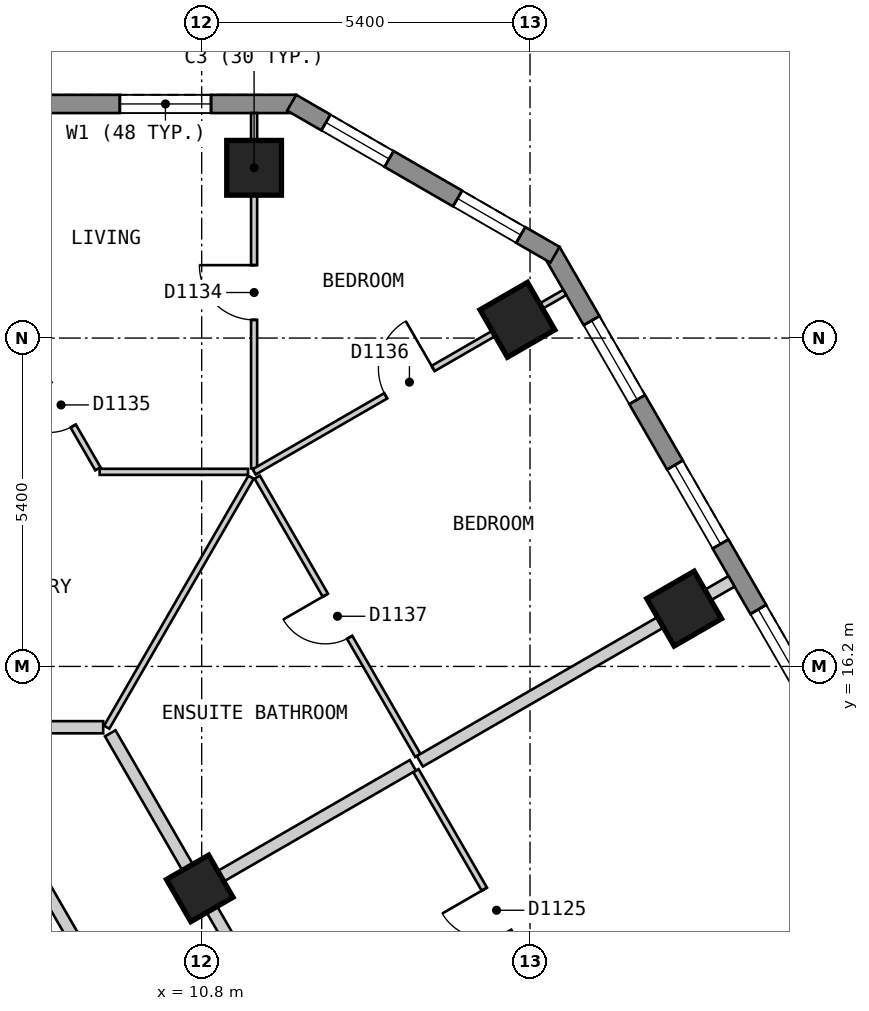
"""IFC4 building model, lengths in metres.
Left out: names, types, materials, properties, quantities, classifications, styles, units other than length and angle.
Written with IfcOpenShell. Run it as: python <this file> out.ifc"""

import sys

from ifc_helpers import new_model, si_unit, direction, frame, frame_2d, origin, origin_2d, place, context, subcontext, project, spatial, polyline, rectangle, outline, extrude, element, fill, save


model = new_model("IFC4")
c1 = context("Model", 3, precision=1e-05, world=origin(), true_north=direction((0.0, 1.0)))
c2 = subcontext(c1, "Body", "Model", "MODEL_VIEW")
j1 = project(units=[si_unit("LENGTHUNIT", "METRE"), si_unit("PLANEANGLEUNIT", "RADIAN")], contexts=[c1])
p1 = place(None, origin())
s1 = spatial("IfcSite", under=j1, at=p1, CompositionType="ELEMENT")
p2 = place(p1, origin())
s2 = spatial("IfcBuilding", under=s1, at=p2, CompositionType="ELEMENT")
p3 = place(p2, frame((0.0, 0.0, 150.6)))
s3 = spatial("IfcBuildingStorey", under=s2, at=p3, CompositionType="ELEMENT", Elevation=150.6)
for number, where, z_axis, x_axis in (
    (1, (11.662, 24.4, 0.0), (0.0, 0.0, 1.0), (-1.0, 0.0, 0.0)),
    (2, (18.735, 17.15, 0.0), (0.0, 0.0, 1.0), (-0.5, 0.866, 0.0)),
    (3, (15.993, 21.9, 0.0), (0.0, 0.0, 1.0), (-0.5, 0.866, 0.0)),
):
    element("IfcColumn", number, at=place(p3, frame(where, z_axis=z_axis, x_axis=x_axis)), inside=s3, PredefinedType="COLUMN", context=c2, shape_type="SweptSolid", body=[
        extrude(rectangle(XDim=0.9, YDim=0.9, at=origin_2d()), origin(), (0.0, 0.0, 1.0), 3.0),
    ])
p4 = place(p3, frame((10.768, 12.55, 0.0), z_axis=(0.0, 0.0, 1.0), x_axis=(-0.5, 0.866025403784, 0.0)))
e4 = element("IfcColumn", 4, at=p4, inside=s3, PredefinedType="COLUMN", context=c2, shape_type="SweptSolid", body=[
    extrude(rectangle(XDim=0.8, YDim=0.8, at=origin_2d()), origin(), (0.0, 0.0, 1.0), 3.0),
])
p5 = place(p3, frame((12.355, 25.45, 0.0), z_axis=(0.0, 0.0, 1.0), x_axis=(-1.0, 0.0, 0.0)))
e5 = element("IfcWall", 5, at=p5, inside=s3, PredefinedType="SOLIDWALL", context=c2, shape_type="SweptSolid", body=[
    extrude(outline(polyline([(0.0, -0.15), (24.71, -0.15), (24.63, 0.15), (0.08, 0.15), (0.0, -0.15)])), origin(), (0.0, 0.0, 1.0), 2.6),
])
p6 = place(p5, frame((1.401, 0.0, 0.15)))
e6 = element("IfcOpeningElement", 6, at=p6, cuts=e5, PredefinedType="OPENING", context=c2, shape_type="SweptSolid", body=[
    extrude(rectangle(XDim=1.5, YDim=2.1, at=frame_2d((0.75, 1.05))), frame((0.0, 0.16, 0.0), z_axis=(0.0, -1.0, 0.0), x_axis=(1.0, 0.0, 0.0)), (0.0, 0.0, 1.0), 0.32),
])
p7 = place(p5, frame((4.316, 0.0, 0.15)))
e7 = element("IfcOpeningElement", 7, at=p7, cuts=e5, PredefinedType="OPENING", context=c2, shape_type="SweptSolid", body=[
    extrude(rectangle(XDim=1.5, YDim=2.1, at=frame_2d((0.75, 1.05))), frame((0.0, 0.16, 0.0), z_axis=(0.0, -1.0, 0.0), x_axis=(1.0, 0.0, 0.0)), (0.0, 0.0, 1.0), 0.32),
])
p8 = place(p5, frame((7.232, 0.0, 0.15)))
e8 = element("IfcOpeningElement", 8, at=p8, cuts=e5, PredefinedType="OPENING", context=c2, shape_type="SweptSolid", body=[
    extrude(rectangle(XDim=1.5, YDim=2.1, at=frame_2d((0.75, 1.05))), frame((0.0, 0.16, 0.0), z_axis=(0.0, -1.0, 0.0), x_axis=(1.0, 0.0, 0.0)), (0.0, 0.0, 1.0), 0.32),
])
p9 = place(p5, frame((10.147, 0.0, 0.15)))
e9 = element("IfcOpeningElement", 9, at=p9, cuts=e5, PredefinedType="OPENING", context=c2, shape_type="SweptSolid", body=[
    extrude(rectangle(XDim=1.5, YDim=2.1, at=frame_2d((0.75, 1.05))), frame((0.0, 0.16, 0.0), z_axis=(0.0, -1.0, 0.0), x_axis=(1.0, 0.0, 0.0)), (0.0, 0.0, 1.0), 0.32),
])
p10 = place(p5, frame((13.063, 0.0, 0.15)))
e10 = element("IfcOpeningElement", 10, at=p10, cuts=e5, PredefinedType="OPENING", context=c2, shape_type="SweptSolid", body=[
    extrude(rectangle(XDim=1.5, YDim=2.1, at=frame_2d((0.75, 1.05))), frame((0.0, 0.16, 0.0), z_axis=(0.0, -1.0, 0.0), x_axis=(1.0, 0.0, 0.0)), (0.0, 0.0, 1.0), 0.32),
])
p11 = place(p5, frame((15.978, 0.0, 0.15)))
e11 = element("IfcOpeningElement", 11, at=p11, cuts=e5, PredefinedType="OPENING", context=c2, shape_type="SweptSolid", body=[
    extrude(rectangle(XDim=1.5, YDim=2.1, at=frame_2d((0.75, 1.05))), frame((0.0, 0.16, 0.0), z_axis=(0.0, -1.0, 0.0), x_axis=(1.0, 0.0, 0.0)), (0.0, 0.0, 1.0), 0.32),
])
p12 = place(p5, frame((18.894, 0.0, 0.15)))
e12 = element("IfcOpeningElement", 12, at=p12, cuts=e5, PredefinedType="OPENING", context=c2, shape_type="SweptSolid", body=[
    extrude(rectangle(XDim=1.5, YDim=2.1, at=frame_2d((0.75, 1.05))), frame((0.0, 0.16, 0.0), z_axis=(0.0, -1.0, 0.0), x_axis=(1.0, 0.0, 0.0)), (0.0, 0.0, 1.0), 0.32),
])
p13 = place(p5, frame((21.809, 0.0, 0.15)))
e13 = element("IfcOpeningElement", 13, at=p13, cuts=e5, PredefinedType="OPENING", context=c2, shape_type="SweptSolid", body=[
    extrude(rectangle(XDim=1.5, YDim=2.1, at=frame_2d((0.75, 1.05))), frame((0.0, 0.16, 0.0), z_axis=(0.0, -1.0, 0.0), x_axis=(1.0, 0.0, 0.0)), (0.0, 0.0, 1.0), 0.32),
])
p14 = place(p3, frame((28.218, 2.825, 0.0), z_axis=(0.0, 0.0, 1.0), x_axis=(-0.500020536353, 0.866013546791, 0.0)))
e14 = element("IfcWall", 14, at=p14, inside=s3, PredefinedType="SOLIDWALL", context=c2, shape_type="SweptSolid", body=[
    extrude(outline(polyline([(0.0, -0.15), (23.325, -0.15), (23.245, 0.15), (0.08, 0.15), (0.0, -0.15)])), origin(), (0.0, 0.0, 1.0), 2.6),
])
p15 = place(p14, frame((1.314, 0.0, 0.15)))
e15 = element("IfcOpeningElement", 15, at=p15, cuts=e14, PredefinedType="OPENING", context=c2, shape_type="SweptSolid", body=[
    extrude(rectangle(XDim=1.5, YDim=2.1, at=frame_2d((0.75, 1.05))), frame((0.0, 0.16, 0.0), z_axis=(0.0, -1.0, 0.0), x_axis=(1.0, 0.0, 0.0)), (0.0, 0.0, 1.0), 0.32),
])
p16 = place(p14, frame((4.056, 0.0, 0.15)))
e16 = element("IfcOpeningElement", 16, at=p16, cuts=e14, PredefinedType="OPENING", context=c2, shape_type="SweptSolid", body=[
    extrude(rectangle(XDim=1.5, YDim=2.1, at=frame_2d((0.75, 1.05))), frame((0.0, 0.16, 0.0), z_axis=(0.0, -1.0, 0.0), x_axis=(1.0, 0.0, 0.0)), (0.0, 0.0, 1.0), 0.32),
])
p17 = place(p14, frame((6.798, 0.0, 0.15)))
e17 = element("IfcOpeningElement", 17, at=p17, cuts=e14, PredefinedType="OPENING", context=c2, shape_type="SweptSolid", body=[
    extrude(rectangle(XDim=1.5, YDim=2.1, at=frame_2d((0.75, 1.05))), frame((0.0, 0.16, 0.0), z_axis=(0.0, -1.0, 0.0), x_axis=(1.0, 0.0, 0.0)), (0.0, 0.0, 1.0), 0.32),
])
p18 = place(p14, frame((9.541, 0.0, 0.15)))
e18 = element("IfcOpeningElement", 18, at=p18, cuts=e14, PredefinedType="OPENING", context=c2, shape_type="SweptSolid", body=[
    extrude(rectangle(XDim=1.5, YDim=2.1, at=frame_2d((0.75, 1.05))), frame((0.0, 0.16, 0.0), z_axis=(0.0, -1.0, 0.0), x_axis=(1.0, 0.0, 0.0)), (0.0, 0.0, 1.0), 0.32),
])
p19 = place(p14, frame((12.284, 0.0, 0.15)))
e19 = element("IfcOpeningElement", 19, at=p19, cuts=e14, PredefinedType="OPENING", context=c2, shape_type="SweptSolid", body=[
    extrude(rectangle(XDim=1.5, YDim=2.1, at=frame_2d((0.75, 1.05))), frame((0.0, 0.16, 0.0), z_axis=(0.0, -1.0, 0.0), x_axis=(1.0, 0.0, 0.0)), (0.0, 0.0, 1.0), 0.32),
])
p20 = place(p14, frame((15.027, 0.0, 0.15)))
e20 = element("IfcOpeningElement", 20, at=p20, cuts=e14, PredefinedType="OPENING", context=c2, shape_type="SweptSolid", body=[
    extrude(rectangle(XDim=1.5, YDim=2.1, at=frame_2d((0.75, 1.05))), frame((0.0, 0.16, 0.0), z_axis=(0.0, -1.0, 0.0), x_axis=(1.0, 0.0, 0.0)), (0.0, 0.0, 1.0), 0.32),
])
p21 = place(p14, frame((17.769, 0.0, 0.15)))
e21 = element("IfcOpeningElement", 21, at=p21, cuts=e14, PredefinedType="OPENING", context=c2, shape_type="SweptSolid", body=[
    extrude(rectangle(XDim=1.5, YDim=2.1, at=frame_2d((0.75, 1.05))), frame((0.0, 0.16, 0.0), z_axis=(0.0, -1.0, 0.0), x_axis=(1.0, 0.0, 0.0)), (0.0, 0.0, 1.0), 0.32),
])
p22 = place(p14, frame((20.511, 0.0, 0.15)))
e22 = element("IfcOpeningElement", 22, at=p22, cuts=e14, PredefinedType="OPENING", context=c2, shape_type="SweptSolid", body=[
    extrude(rectangle(XDim=1.5, YDim=2.1, at=frame_2d((0.75, 1.05))), frame((0.0, 0.16, 0.0), z_axis=(0.0, -1.0, 0.0), x_axis=(1.0, 0.0, 0.0)), (0.0, 0.0, 1.0), 0.32),
])
p23 = place(p3, frame((16.61, 22.97, 0.0), z_axis=(0.0, 0.0, 1.0), x_axis=(-0.866022959057, 0.500004234368, 0.0)))
e23 = element("IfcWall", 23, at=p23, inside=s3, PredefinedType="SOLIDWALL", context=c2, shape_type="SweptSolid", body=[
    extrude(outline(polyline([(0.0, -0.15), (5.0, -0.15), (4.92, 0.15), (0.08, 0.15), (0.0, -0.15)])), origin(), (0.0, 0.0, 1.0), 2.6),
])
p24 = place(p23, frame((0.65, 0.0, 0.15)))
e24 = element("IfcOpeningElement", 24, at=p24, cuts=e23, PredefinedType="OPENING", context=c2, shape_type="SweptSolid", body=[
    extrude(rectangle(XDim=1.2, YDim=2.1, at=frame_2d((0.6, 1.05))), frame((0.0, 0.16, 0.0), z_axis=(0.0, -1.0, 0.0), x_axis=(1.0, 0.0, 0.0)), (0.0, 0.0, 1.0), 0.32),
])
p25 = place(p23, frame((3.15, 0.0, 0.15)))
e25 = element("IfcOpeningElement", 25, at=p25, cuts=e23, PredefinedType="OPENING", context=c2, shape_type="SweptSolid", body=[
    extrude(rectangle(XDim=1.2, YDim=2.1, at=frame_2d((0.6, 1.05))), frame((0.0, 0.16, 0.0), z_axis=(0.0, -1.0, 0.0), x_axis=(1.0, 0.0, 0.0)), (0.0, 0.0, 1.0), 0.32),
])
p26 = place(p3, frame((7.967, 13.0, 0.0), z_axis=(0.0, 0.0, 1.0), x_axis=(0.50003774998, -0.866003607726, 0.0)))
e26 = element("IfcWall", 26, at=p26, inside=s3, PredefinedType="PARTITIONING", context=c2, shape_type="SweptSolid", body=[
    extrude(rectangle(XDim=14.433, YDim=0.2, at=frame_2d((7.217, 0.0))), origin(), (0.0, 0.0, 1.0), 2.6),
])
p27 = place(p26, frame((6.824, 0.0, 0.0)))
e27 = element("IfcOpeningElement", 27, at=p27, cuts=e26, PredefinedType="OPENING", context=c2, shape_type="SweptSolid", body=[
    extrude(rectangle(XDim=0.9, YDim=2.1, at=frame_2d((0.45, 1.05))), frame((0.0, 0.11, 0.0), z_axis=(0.0, -1.0, 0.0), x_axis=(1.0, 0.0, 0.0)), (0.0, 0.0, 1.0), 0.22),
])
p28 = place(p3, frame((9.296, 15.1, 0.0), z_axis=(0.0, 0.0, 1.0), x_axis=(0.499974024244, -0.866040400375, 0.0)))
e28 = element("IfcWall", 28, at=p28, inside=s3, PredefinedType="PARTITIONING", context=c2, shape_type="SweptSolid", body=[
    extrude(rectangle(XDim=16.857, YDim=0.2, at=frame_2d((8.429, 0.0))), origin(), (0.0, 0.0, 1.0), 2.6),
])
p29 = place(p28, frame((11.522, 0.0, 0.0)))
e29 = element("IfcOpeningElement", 29, at=p29, cuts=e28, PredefinedType="OPENING", context=c2, shape_type="SweptSolid", body=[
    extrude(rectangle(XDim=1.0, YDim=2.1, at=frame_2d((0.5, 1.05))), frame((0.0, 0.11, 0.0), z_axis=(0.0, -1.0, 0.0), x_axis=(1.0, 0.0, 0.0)), (0.0, 0.0, 1.0), 0.22),
])
p30 = place(p3, frame((6.697, 15.2, 0.0), z_axis=(0.0, 0.0, 1.0), x_axis=(1.0, 0.0, 0.0)))
e30 = element("IfcWall", 30, at=p30, inside=s3, PredefinedType="PARTITIONING", context=c2, shape_type="SweptSolid", body=[
    extrude(rectangle(XDim=2.483, YDim=0.2, at=frame_2d((1.241, 0.0))), origin(), (0.0, 0.0, 1.0), 2.6),
])
p31 = place(p3, frame((7.881, 21.55, 0.0), z_axis=(0.0, 0.0, 1.0), x_axis=(0.499821239653, -0.866128586522, 0.0)))
e31 = element("IfcWall", 31, at=p31, inside=s3, PredefinedType="PARTITIONING", context=c2, shape_type="SweptSolid", body=[
    extrude(rectangle(XDim=2.425, YDim=0.1, at=frame_2d((1.212, 0.0))), origin(), (0.0, 0.0, 1.0), 2.6),
])
p32 = place(p31, frame((0.812, 0.0, 0.0)))
e32 = element("IfcOpeningElement", 32, at=p32, cuts=e31, PredefinedType="OPENING", context=c2, shape_type="SweptSolid", body=[
    extrude(rectangle(XDim=0.8, YDim=2.1, at=frame_2d((0.4, 1.05))), frame((0.0, 0.06, 0.0), z_axis=(0.0, -1.0, 0.0), x_axis=(1.0, 0.0, 0.0)), (0.0, 0.0, 1.0), 0.12),
])
p33 = place(p3, frame((14.323, 14.487, 0.0), z_axis=(0.0, 0.0, 1.0), x_axis=(0.500011052545, -0.866019022501, 0.0)))
e33 = element("IfcWall", 33, at=p33, inside=s3, PredefinedType="PARTITIONING", context=c2, shape_type="SweptSolid", body=[
    extrude(rectangle(XDim=16.208, YDim=0.1, at=frame_2d((8.104, 0.0))), origin(), (0.0, 0.0, 1.0), 2.6),
])
p34 = place(p33, frame((8.484, 0.0, 0.0)))
e34 = element("IfcOpeningElement", 34, at=p34, cuts=e33, PredefinedType="OPENING", context=c2, shape_type="SweptSolid", body=[
    extrude(rectangle(XDim=0.9, YDim=2.1, at=frame_2d((0.45, 1.05))), frame((0.0, 0.06, 0.0), z_axis=(0.0, -1.0, 0.0), x_axis=(1.0, 0.0, 0.0)), (0.0, 0.0, 1.0), 0.12),
])
p35 = place(p33, frame((2.252, 0.0, 0.0)))
e35 = element("IfcOpeningElement", 35, at=p35, cuts=e33, PredefinedType="OPENING", context=c2, shape_type="SweptSolid", body=[
    extrude(rectangle(XDim=0.8, YDim=2.1, at=frame_2d((0.4, 1.05))), frame((0.0, 0.06, 0.0), z_axis=(0.0, -1.0, 0.0), x_axis=(1.0, 0.0, 0.0)), (0.0, 0.0, 1.0), 0.12),
])
p36 = place(p33, frame((13.167, 0.0, 0.0)))
e36 = element("IfcOpeningElement", 36, at=p36, cuts=e33, PredefinedType="OPENING", context=c2, shape_type="SweptSolid", body=[
    extrude(rectangle(XDim=0.8, YDim=2.1, at=frame_2d((0.4, 1.05))), frame((0.0, 0.06, 0.0), z_axis=(0.0, -1.0, 0.0), x_axis=(1.0, 0.0, 0.0)), (0.0, 0.0, 1.0), 0.12),
])
p37 = place(p3, frame((11.713, 19.313, 0.0), z_axis=(0.0, 0.0, 1.0), x_axis=(0.499945064984, -0.866057118208, 0.0)))
e37 = element("IfcWall", 37, at=p37, inside=s3, PredefinedType="PARTITIONING", context=c2, shape_type="SweptSolid", body=[
    extrude(rectangle(XDim=5.285, YDim=0.1, at=frame_2d((2.642, 0.0))), origin(), (0.0, 0.0, 1.0), 2.6),
])
p38 = place(p37, frame((2.242, 0.0, 0.0)))
e38 = element("IfcOpeningElement", 38, at=p38, cuts=e37, PredefinedType="OPENING", context=c2, shape_type="SweptSolid", body=[
    extrude(rectangle(XDim=0.8, YDim=2.1, at=frame_2d((0.4, 1.05))), frame((0.0, 0.06, 0.0), z_axis=(0.0, -1.0, 0.0), x_axis=(1.0, 0.0, 0.0)), (0.0, 0.0, 1.0), 0.12),
])
p39 = place(p3, frame((9.122, 19.4, 0.0), z_axis=(0.0, 0.0, 1.0), x_axis=(1.0, 0.0, 0.0)))
e39 = element("IfcWall", 39, at=p39, inside=s3, PredefinedType="PARTITIONING", context=c2, shape_type="SweptSolid", body=[
    extrude(rectangle(XDim=2.44, YDim=0.1, at=frame_2d((1.22, 0.0))), origin(), (0.0, 0.0, 1.0), 2.6),
])
p40 = place(p3, frame((9.238, 15.2, 0.0), z_axis=(0.0, 0.0, 1.0), x_axis=(0.499988022762, 0.866032318735, 0.0)))
e40 = element("IfcWall", 40, at=p40, inside=s3, PredefinedType="PARTITIONING", context=c2, shape_type="SweptSolid", body=[
    extrude(rectangle(XDim=4.748, YDim=0.1, at=frame_2d((2.374, 0.0))), origin(), (0.0, 0.0, 1.0), 2.6),
])
p41 = place(p3, frame((11.662, 19.456, 0.0), z_axis=(0.0, 0.0, 1.0), x_axis=(0.0, 1.0, 0.0)))
e41 = element("IfcWall", 41, at=p41, inside=s3, PredefinedType="PARTITIONING", context=c2, shape_type="SweptSolid", body=[
    extrude(rectangle(XDim=5.844, YDim=0.1, at=frame_2d((2.922, 0.0))), origin(), (0.0, 0.0, 1.0), 2.6),
])
p42 = place(p41, frame((2.443, 0.0, 0.0)))
e42 = element("IfcOpeningElement", 42, at=p42, cuts=e41, PredefinedType="OPENING", context=c2, shape_type="SweptSolid", body=[
    extrude(rectangle(XDim=0.9, YDim=2.1, at=frame_2d((0.45, 1.05))), frame((0.0, 0.06, 0.0), z_axis=(0.0, -1.0, 0.0), x_axis=(1.0, 0.0, 0.0)), (0.0, 0.0, 1.0), 0.12),
])
p43 = place(p3, frame((11.663, 19.4, 0.0), z_axis=(0.0, 0.0, 1.0), x_axis=(0.865941558533, 0.500145196124, 0.0)))
e43 = element("IfcWall", 43, at=p43, inside=s3, PredefinedType="PARTITIONING", context=c2, shape_type="SweptSolid", body=[
    extrude(rectangle(XDim=5.899, YDim=0.1, at=frame_2d((2.949, 0.0))), origin(), (0.0, 0.0, 1.0), 2.6),
])
p44 = place(p43, frame((2.499, 0.0, 0.0)))
e44 = element("IfcOpeningElement", 44, at=p44, cuts=e43, PredefinedType="OPENING", context=c2, shape_type="SweptSolid", body=[
    extrude(rectangle(XDim=0.9, YDim=2.1, at=frame_2d((0.45, 1.05))), frame((0.0, 0.06, 0.0), z_axis=(0.0, -1.0, 0.0), x_axis=(1.0, 0.0, 0.0)), (0.0, 0.0, 1.0), 0.12),
])
p45 = place(p3, frame((10.854, 12.6, 0.0), z_axis=(0.0, 0.0, 1.0), x_axis=(0.866031112038, 0.499990112884, 0.0)))
e45 = element("IfcWall", 45, at=p45, inside=s3, PredefinedType="PARTITIONING", context=c2, shape_type="SweptSolid", body=[
    extrude(rectangle(XDim=3.948, YDim=0.2, at=frame_2d((1.974, 0.0))), origin(), (0.0, 0.0, 1.0), 2.6),
])
p46 = place(p3, frame((14.388, 14.64, 0.0), z_axis=(0.0, 0.0, 1.0), x_axis=(0.866044090212, 0.499967632761, 0.0)))
e46 = element("IfcWall", 46, at=p46, inside=s3, PredefinedType="PARTITIONING", context=c2, shape_type="SweptSolid", body=[
    extrude(rectangle(XDim=5.919, YDim=0.2, at=frame_2d((2.959, 0.0))), origin(), (0.0, 0.0, 1.0), 2.6),
])
p47 = place(p6, origin())
e47 = element("IfcWindow", 47, at=p47, inside=s3, PartitioningType="SINGLE_PANEL", PredefinedType="WINDOW", context=c2, shape_type="SweptSolid", body=[
    extrude(rectangle(XDim=1.5, YDim=2.1, at=frame_2d((0.75, 1.05))), frame((0.0, 0.03, 0.0), z_axis=(0.0, -1.0, 0.0), x_axis=(1.0, 0.0, 0.0)), (0.0, 0.0, 1.0), 0.06),
])
fill(e6, e47)
p48 = place(p20, origin())
e48 = element("IfcWindow", 48, at=p48, inside=s3, PartitioningType="SINGLE_PANEL", PredefinedType="WINDOW", context=c2, shape_type="SweptSolid", body=[
    extrude(rectangle(XDim=1.5, YDim=2.1, at=frame_2d((0.75, 1.05))), frame((0.0, 0.03, 0.0), z_axis=(0.0, -1.0, 0.0), x_axis=(1.0, 0.0, 0.0)), (0.0, 0.0, 1.0), 0.06),
])
fill(e20, e48)
p49 = place(p21, origin())
e49 = element("IfcWindow", 49, at=p49, inside=s3, PartitioningType="SINGLE_PANEL", PredefinedType="WINDOW", context=c2, shape_type="SweptSolid", body=[
    extrude(rectangle(XDim=1.5, YDim=2.1, at=frame_2d((0.75, 1.05))), frame((0.0, 0.03, 0.0), z_axis=(0.0, -1.0, 0.0), x_axis=(1.0, 0.0, 0.0)), (0.0, 0.0, 1.0), 0.06),
])
fill(e21, e49)
p50 = place(p22, origin())
e50 = element("IfcWindow", 50, at=p50, inside=s3, PartitioningType="SINGLE_PANEL", PredefinedType="WINDOW", context=c2, shape_type="SweptSolid", body=[
    extrude(rectangle(XDim=1.5, YDim=2.1, at=frame_2d((0.75, 1.05))), frame((0.0, 0.03, 0.0), z_axis=(0.0, -1.0, 0.0), x_axis=(1.0, 0.0, 0.0)), (0.0, 0.0, 1.0), 0.06),
])
fill(e22, e50)
p51 = place(p24, origin())
e51 = element("IfcWindow", 51, at=p51, inside=s3, PartitioningType="SINGLE_PANEL", PredefinedType="WINDOW", context=c2, shape_type="SweptSolid", body=[
    extrude(rectangle(XDim=1.2, YDim=2.1, at=frame_2d((0.6, 1.05))), frame((0.0, 0.03, 0.0), z_axis=(0.0, -1.0, 0.0), x_axis=(1.0, 0.0, 0.0)), (0.0, 0.0, 1.0), 0.06),
])
fill(e24, e51)
p52 = place(p25, origin())
e52 = element("IfcWindow", 52, at=p52, inside=s3, PartitioningType="SINGLE_PANEL", PredefinedType="WINDOW", context=c2, shape_type="SweptSolid", body=[
    extrude(rectangle(XDim=1.2, YDim=2.1, at=frame_2d((0.6, 1.05))), frame((0.0, 0.03, 0.0), z_axis=(0.0, -1.0, 0.0), x_axis=(1.0, 0.0, 0.0)), (0.0, 0.0, 1.0), 0.06),
])
fill(e25, e52)
p53 = place(p35, origin())
e53 = element("IfcDoor", 53, at=p53, inside=s3, OperationType="SINGLE_SWING_LEFT", PredefinedType="DOOR", context=c2, shape_type="SweptSolid", body=[
    extrude(rectangle(XDim=0.8, YDim=2.1, at=frame_2d((0.4, 1.05))), frame((0.0, 0.025, 0.0), z_axis=(0.0, -1.0, 0.0), x_axis=(1.0, 0.0, 0.0)), (0.0, 0.0, 1.0), 0.05),
])
fill(e35, e53)
p54 = place(p42, origin())
e54 = element("IfcDoor", 54, at=p54, inside=s3, OperationType="SINGLE_SWING_RIGHT", PredefinedType="DOOR", context=c2, shape_type="SweptSolid", body=[
    extrude(rectangle(XDim=0.9, YDim=2.1, at=frame_2d((0.45, 1.05))), frame((0.0, 0.025, 0.0), z_axis=(0.0, -1.0, 0.0), x_axis=(1.0, 0.0, 0.0)), (0.0, 0.0, 1.0), 0.05),
])
fill(e42, e54)
p55 = place(p32, origin())
e55 = element("IfcDoor", 55, at=p55, inside=s3, OperationType="SINGLE_SWING_LEFT", PredefinedType="DOOR", context=c2, shape_type="SweptSolid", body=[
    extrude(rectangle(XDim=0.8, YDim=2.1, at=frame_2d((0.4, 1.05))), frame((0.0, 0.025, 0.0), z_axis=(0.0, -1.0, 0.0), x_axis=(1.0, 0.0, 0.0)), (0.0, 0.0, 1.0), 0.05),
])
fill(e32, e55)
p56 = place(p44, origin())
e56 = element("IfcDoor", 56, at=p56, inside=s3, OperationType="SINGLE_SWING_RIGHT", PredefinedType="DOOR", context=c2, shape_type="SweptSolid", body=[
    extrude(rectangle(XDim=0.9, YDim=2.1, at=frame_2d((0.45, 1.05))), frame((0.0, 0.025, 0.0), z_axis=(0.0, -1.0, 0.0), x_axis=(1.0, 0.0, 0.0)), (0.0, 0.0, 1.0), 0.05),
])
fill(e44, e56)
p57 = place(p38, origin())
e57 = element("IfcDoor", 57, at=p57, inside=s3, OperationType="SINGLE_SWING_LEFT", PredefinedType="DOOR", context=c2, shape_type="SweptSolid", body=[
    extrude(rectangle(XDim=0.8, YDim=2.1, at=frame_2d((0.4, 1.05))), frame((0.0, 0.025, 0.0), z_axis=(0.0, -1.0, 0.0), x_axis=(1.0, 0.0, 0.0)), (0.0, 0.0, 1.0), 0.05),
])
fill(e38, e57)
save(model, sys.argv[1])
